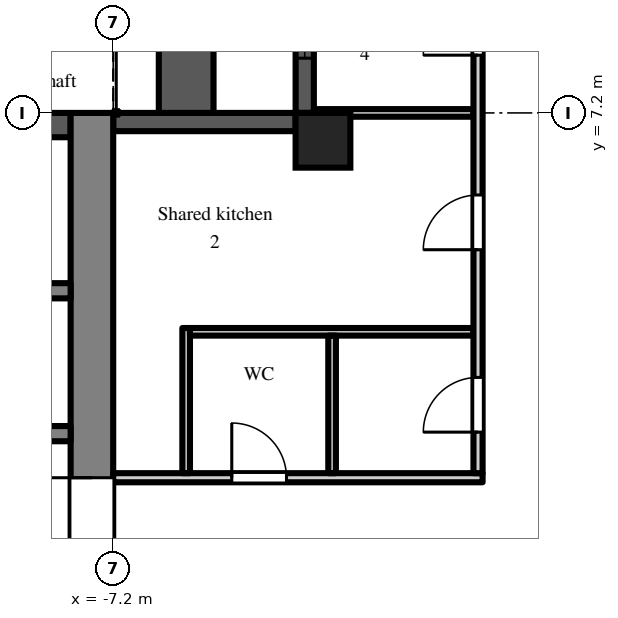
"""IFC4 building model, lengths in metres.
Left out: names, types, materials, properties, quantities, classifications, styles, units other than length and angle.
Written with IfcOpenShell. Run it as: python <this file> out.ifc"""

import sys

from ifc_helpers import new_model, si_unit, direction, frame, frame_2d, origin, origin_2d, place, context, subcontext, project, spatial, rectangle, extrude, element, fill, save


model = new_model("IFC4")
c1 = context("Model", 3, precision=1e-05, world=origin(), true_north=direction((0.0, 1.0)))
c2 = subcontext(c1, "Body", "Model", "MODEL_VIEW")
j1 = project(units=[si_unit("LENGTHUNIT", "METRE"), si_unit("PLANEANGLEUNIT", "RADIAN")], contexts=[c1])
p1 = place(None, origin())
s1 = spatial("IfcSite", under=j1, at=p1, CompositionType="ELEMENT")
p2 = place(p1, origin())
s2 = spatial("IfcBuilding", under=s1, at=p2, CompositionType="ELEMENT")
p3 = place(p2, frame((0.0, 0.0, 225.9)))
s3 = spatial("IfcBuildingStorey", under=s2, at=p3, CompositionType="ELEMENT", Elevation=225.9)
p4 = place(p3, frame((-3.75, 6.75, 0.0), z_axis=(0.0, 0.0, 1.0), x_axis=(1.0, 0.0, 0.0)))
e1 = element("IfcColumn", 1, at=p4, inside=s3, PredefinedType="COLUMN", context=c2, shape_type="SweptSolid", body=[
    extrude(rectangle(XDim=0.9, YDim=0.9, at=origin_2d()), origin(), (0.0, 0.0, 1.0), 3.0),
])
p5 = place(p3, frame((-4.05, 14.4, 0.0), z_axis=(0.0, 0.0, 1.0), x_axis=(0.0, -1.0, 0.0)))
e2 = element("IfcWall", 2, at=p5, inside=s3, PredefinedType="SOLIDWALL", context=c2, shape_type="SweptSolid", body=[
    extrude(rectangle(XDim=7.2, YDim=0.3, at=frame_2d((3.6, 0.0))), origin(), (0.0, 0.0, 1.0), 2.3),
])
p6 = place(p5, frame((3.0, 0.0, 0.0)))
e3 = element("IfcOpeningElement", 3, at=p6, cuts=e2, PredefinedType="OPENING", context=c2, shape_type="SweptSolid", body=[
    extrude(rectangle(XDim=1.2, YDim=2.05, at=frame_2d((0.6, 1.025))), frame((0.0, 0.16, 0.0), z_axis=(0.0, -1.0, 0.0), x_axis=(1.0, 0.0, 0.0)), (0.0, 0.0, 1.0), 0.32),
])
p7 = place(p5, frame((0.9, 0.0, 0.2)))
e4 = element("IfcOpeningElement", 4, at=p7, cuts=e2, PredefinedType="OPENING", context=c2, shape_type="SweptSolid", body=[
    extrude(rectangle(XDim=1.8, YDim=1.85, at=frame_2d((0.9, 0.925))), frame((0.0, 0.16, 0.0), z_axis=(0.0, -1.0, 0.0), x_axis=(1.0, 0.0, 0.0)), (0.0, 0.0, 1.0), 0.32),
])
p8 = place(p5, frame((4.5, 0.0, 0.2)))
e5 = element("IfcOpeningElement", 5, at=p8, cuts=e2, PredefinedType="OPENING", context=c2, shape_type="SweptSolid", body=[
    extrude(rectangle(XDim=1.8, YDim=1.85, at=frame_2d((0.9, 0.925))), frame((0.0, 0.16, 0.0), z_axis=(0.0, -1.0, 0.0), x_axis=(1.0, 0.0, 0.0)), (0.0, 0.0, 1.0), 0.32),
])
p9 = place(p3, frame((-4.2, 7.05, 0.0), z_axis=(0.0, 0.0, 1.0), x_axis=(-1.0, 0.0, 0.0)))
e6 = element("IfcWall", 6, at=p9, inside=s3, PredefinedType="SOLIDWALL", context=c2, shape_type="SweptSolid", body=[
    extrude(rectangle(XDim=3.0, YDim=0.3, at=frame_2d((1.5, 0.0))), origin(), (0.0, 0.0, 1.0), 2.3),
])
p10 = place(p3, frame((-6.0, 7.2, 0.0), z_axis=(0.0, 0.0, 1.0), x_axis=(0.0, 1.0, 0.0)))
e7 = element("IfcWall", 7, at=p10, inside=s3, PredefinedType="PARAPET", context=c2, shape_type="SweptSolid", body=[
    extrude(rectangle(XDim=7.2, YDim=0.9, at=frame_2d((3.6, 0.0))), origin(), (0.0, 0.0, 1.0), 0.8),
])
p11 = place(p3, frame((-7.55, -7.2, 0.0), z_axis=(0.0, 0.0, 1.0), x_axis=(0.0, 1.0, 0.0)))
e8 = element("IfcWall", 8, at=p11, inside=s3, PredefinedType="SHEAR", context=c2, shape_type="SweptSolid", body=[
    extrude(rectangle(XDim=14.4, YDim=0.7, at=frame_2d((7.2, 0.0))), origin(), (0.0, 0.0, 1.0), 2.6),
])
p12 = place(p11, frame((6.0, 0.0, 0.0)))
e9 = element("IfcOpeningElement", 9, at=p12, cuts=e8, PredefinedType="OPENING", context=c2, shape_type="SweptSolid", body=[
    extrude(rectangle(XDim=2.4, YDim=2.2, at=frame_2d((1.2, 1.1))), frame((0.0, 0.36, 0.0), z_axis=(0.0, -1.0, 0.0), x_axis=(1.0, 0.0, 0.0)), (0.0, 0.0, 1.0), 0.72),
])
p13 = place(p3, frame((-7.9, 7.0, 0.0), z_axis=(0.0, 0.0, 1.0), x_axis=(-1.0, 0.0, 0.0)))
e10 = element("IfcWall", 10, at=p13, inside=s3, PredefinedType="SHEAR", context=c2, shape_type="SweptSolid", body=[
    extrude(rectangle(XDim=12.95, YDim=0.4, at=frame_2d((6.475, 0.0))), origin(), (0.0, 0.0, 1.0), 2.6),
])
p14 = place(p3, frame((-7.9, 1.925, 0.0), z_axis=(0.0, 0.0, 1.0), x_axis=(-1.0, 0.0, 0.0)))
e11 = element("IfcWall", 11, at=p14, inside=s3, PredefinedType="SHEAR", context=c2, shape_type="SweptSolid", body=[
    extrude(rectangle(XDim=12.95, YDim=0.25, at=frame_2d((6.475, 0.0))), origin(), (0.0, 0.0, 1.0), 2.6),
])
p15 = place(p14, frame((4.825, 0.0, 0.0)))
e12 = element("IfcOpeningElement", 12, at=p15, cuts=e11, PredefinedType="OPENING", context=c2, shape_type="SweptSolid", body=[
    extrude(rectangle(XDim=1.1, YDim=2.1, at=frame_2d((0.55, 1.05))), frame((0.0, 0.135, 0.0), z_axis=(0.0, -1.0, 0.0), x_axis=(1.0, 0.0, 0.0)), (0.0, 0.0, 1.0), 0.27),
])
p16 = place(p14, frame((7.025, 0.0, 0.0)))
e13 = element("IfcOpeningElement", 13, at=p16, cuts=e11, PredefinedType="OPENING", context=c2, shape_type="SweptSolid", body=[
    extrude(rectangle(XDim=1.1, YDim=2.1, at=frame_2d((0.55, 1.05))), frame((0.0, 0.135, 0.0), z_axis=(0.0, -1.0, 0.0), x_axis=(1.0, 0.0, 0.0)), (0.0, 0.0, 1.0), 0.27),
])
p17 = place(p14, frame((9.225, 0.0, 0.0)))
e14 = element("IfcOpeningElement", 14, at=p17, cuts=e11, PredefinedType="OPENING", context=c2, shape_type="SweptSolid", body=[
    extrude(rectangle(XDim=1.1, YDim=2.1, at=frame_2d((0.55, 1.05))), frame((0.0, 0.135, 0.0), z_axis=(0.0, -1.0, 0.0), x_axis=(1.0, 0.0, 0.0)), (0.0, 0.0, 1.0), 0.27),
])
p18 = place(p14, frame((0.525, 0.0, 0.0)))
e15 = element("IfcOpeningElement", 15, at=p18, cuts=e11, PredefinedType="OPENING", context=c2, shape_type="SweptSolid", body=[
    extrude(rectangle(XDim=0.9, YDim=2.1, at=frame_2d((0.45, 1.05))), frame((0.0, 0.135, 0.0), z_axis=(0.0, -1.0, 0.0), x_axis=(1.0, 0.0, 0.0)), (0.0, 0.0, 1.0), 0.27),
])
p19 = place(p14, frame((2.625, 0.0, 0.0)))
e16 = element("IfcOpeningElement", 16, at=p19, cuts=e11, PredefinedType="OPENING", context=c2, shape_type="SweptSolid", body=[
    extrude(rectangle(XDim=1.1, YDim=2.1, at=frame_2d((0.55, 1.05))), frame((0.0, 0.135, 0.0), z_axis=(0.0, -1.0, 0.0), x_axis=(1.0, 0.0, 0.0)), (0.0, 0.0, 1.0), 0.27),
])
p20 = place(p14, frame((11.525, 0.0, 0.0)))
e17 = element("IfcOpeningElement", 17, at=p20, cuts=e11, PredefinedType="OPENING", context=c2, shape_type="SweptSolid", body=[
    extrude(rectangle(XDim=0.9, YDim=2.1, at=frame_2d((0.45, 1.05))), frame((0.0, 0.135, 0.0), z_axis=(0.0, -1.0, 0.0), x_axis=(1.0, 0.0, 0.0)), (0.0, 0.0, 1.0), 0.27),
])
p21 = place(p3, frame((-7.9, 4.275, 0.0), z_axis=(0.0, 0.0, 1.0), x_axis=(-1.0, 0.0, 0.0)))
e18 = element("IfcWall", 18, at=p21, inside=s3, PredefinedType="SHEAR", context=c2, shape_type="SweptSolid", body=[
    extrude(rectangle(XDim=1.95, YDim=0.25, at=frame_2d((0.975, 0.0))), origin(), (0.0, 0.0, 1.0), 2.6),
])
p22 = place(p3, frame((-7.2, 1.2, 0.0), z_axis=(0.0, 0.0, 1.0), x_axis=(1.0, 0.0, 0.0)))
e19 = element("IfcWall", 19, at=p22, inside=s3, PredefinedType="PARTITIONING", context=c2, shape_type="SweptSolid", body=[
    extrude(rectangle(XDim=6.075, YDim=0.15, at=frame_2d((3.038, 0.0))), origin(), (0.0, 0.0, 1.0), 2.6),
])
p23 = place(p22, frame((1.95, 0.0, 0.0)))
e20 = element("IfcOpeningElement", 20, at=p23, cuts=e19, PredefinedType="OPENING", context=c2, shape_type="SweptSolid", body=[
    extrude(rectangle(XDim=0.9, YDim=2.1, at=frame_2d((0.45, 1.05))), frame((0.0, 0.085, 0.0), z_axis=(0.0, -1.0, 0.0), x_axis=(1.0, 0.0, 0.0)), (0.0, 0.0, 1.0), 0.17),
])
p24 = place(p3, frame((-6.0, 1.275, 0.0), z_axis=(0.0, 0.0, 1.0), x_axis=(0.0, 1.0, 0.0)))
e21 = element("IfcWall", 21, at=p24, inside=s3, PredefinedType="PARTITIONING", context=c2, shape_type="SweptSolid", body=[
    extrude(rectangle(XDim=2.388, YDim=0.125, at=frame_2d((1.194, 0.0))), origin(), (0.0, 0.0, 1.0), 2.6),
])
p25 = place(p3, frame((-5.938, 3.6, 0.0), z_axis=(0.0, 0.0, 1.0), x_axis=(1.0, 0.0, 0.0)))
e22 = element("IfcWall", 22, at=p25, inside=s3, PredefinedType="PARTITIONING", context=c2, shape_type="SweptSolid", body=[
    extrude(rectangle(XDim=4.663, YDim=0.125, at=frame_2d((2.331, 0.0))), origin(), (0.0, 0.0, 1.0), 2.6),
])
p26 = place(p3, frame((-3.9, 7.2, 0.0), z_axis=(0.0, 0.0, 1.0), x_axis=(1.0, 0.0, 0.0)))
e23 = element("IfcWall", 23, at=p26, inside=s3, PredefinedType="PARTITIONING", context=c2, shape_type="SweptSolid", body=[
    extrude(rectangle(XDim=2.625, YDim=0.125, at=frame_2d((1.312, 0.0))), origin(), (0.0, 0.0, 1.0), 2.6),
])
p27 = place(p3, frame((-3.6, 1.275, 0.0), z_axis=(0.0, 0.0, 1.0), x_axis=(0.0, 1.0, 0.0)))
e24 = element("IfcWall", 24, at=p27, inside=s3, PredefinedType="PARTITIONING", context=c2, shape_type="SweptSolid", body=[
    extrude(rectangle(XDim=2.263, YDim=0.125, at=frame_2d((1.131, 0.0))), origin(), (0.0, 0.0, 1.0), 2.6),
])
p28 = place(p3, frame((-1.2, 1.275, 0.0), z_axis=(0.0, 0.0, 1.0), x_axis=(0.0, 1.0, 0.0)))
e25 = element("IfcWall", 25, at=p28, inside=s3, PredefinedType="PARTITIONING", context=c2, shape_type="SweptSolid", body=[
    extrude(rectangle(XDim=18.25, YDim=0.15, at=frame_2d((9.125, 0.0))), origin(), (0.0, 0.0, 1.0), 2.6),
])
p29 = place(p28, frame((0.675, 0.0, 0.0)))
e26 = element("IfcOpeningElement", 26, at=p29, cuts=e25, PredefinedType="OPENING", context=c2, shape_type="SweptSolid", body=[
    extrude(rectangle(XDim=0.9, YDim=2.1, at=frame_2d((0.45, 1.05))), frame((0.0, 0.085, 0.0), z_axis=(0.0, -1.0, 0.0), x_axis=(1.0, 0.0, 0.0)), (0.0, 0.0, 1.0), 0.17),
])
p30 = place(p28, frame((3.675, 0.0, 0.0)))
e27 = element("IfcOpeningElement", 27, at=p30, cuts=e25, PredefinedType="OPENING", context=c2, shape_type="SweptSolid", body=[
    extrude(rectangle(XDim=0.9, YDim=2.1, at=frame_2d((0.45, 1.05))), frame((0.0, 0.085, 0.0), z_axis=(0.0, -1.0, 0.0), x_axis=(1.0, 0.0, 0.0)), (0.0, 0.0, 1.0), 0.17),
])
p31 = place(p28, frame((6.875, 0.0, 0.0)))
e28 = element("IfcOpeningElement", 28, at=p31, cuts=e25, PredefinedType="OPENING", context=c2, shape_type="SweptSolid", body=[
    extrude(rectangle(XDim=0.9, YDim=2.1, at=frame_2d((0.45, 1.05))), frame((0.0, 0.085, 0.0), z_axis=(0.0, -1.0, 0.0), x_axis=(1.0, 0.0, 0.0)), (0.0, 0.0, 1.0), 0.17),
])
p32 = place(p28, frame((10.475, 0.0, 0.0)))
e29 = element("IfcOpeningElement", 29, at=p32, cuts=e25, PredefinedType="OPENING", context=c2, shape_type="SweptSolid", body=[
    extrude(rectangle(XDim=0.9, YDim=2.1, at=frame_2d((0.45, 1.05))), frame((0.0, 0.085, 0.0), z_axis=(0.0, -1.0, 0.0), x_axis=(1.0, 0.0, 0.0)), (0.0, 0.0, 1.0), 0.17),
])
p33 = place(p28, frame((13.725, 0.0, 0.0)))
e30 = element("IfcOpeningElement", 30, at=p33, cuts=e25, PredefinedType="OPENING", context=c2, shape_type="SweptSolid", body=[
    extrude(rectangle(XDim=1.0, YDim=2.1, at=frame_2d((0.5, 1.05))), frame((0.0, 0.085, 0.0), z_axis=(0.0, -1.0, 0.0), x_axis=(1.0, 0.0, 0.0)), (0.0, 0.0, 1.0), 0.17),
])
p34 = place(p28, frame((17.075, 0.0, 0.0)))
e31 = element("IfcOpeningElement", 31, at=p34, cuts=e25, PredefinedType="OPENING", context=c2, shape_type="SweptSolid", body=[
    extrude(rectangle(XDim=0.9, YDim=2.1, at=frame_2d((0.45, 1.05))), frame((0.0, 0.085, 0.0), z_axis=(0.0, -1.0, 0.0), x_axis=(1.0, 0.0, 0.0)), (0.0, 0.0, 1.0), 0.17),
])
p35 = place(p8, origin())
e32 = element("IfcWindow", 32, at=p35, inside=s3, PartitioningType="SINGLE_PANEL", PredefinedType="WINDOW", context=c2, shape_type="SweptSolid", body=[
    extrude(rectangle(XDim=1.8, YDim=1.85, at=frame_2d((0.9, 0.925))), frame((0.0, 0.03, 0.0), z_axis=(0.0, -1.0, 0.0), x_axis=(1.0, 0.0, 0.0)), (0.0, 0.0, 1.0), 0.06),
])
fill(e5, e32)
p36 = place(p12, origin())
e33 = element("IfcDoor", 33, at=p36, inside=s3, OperationType="DOUBLE_DOOR_DOUBLE_SWING", PredefinedType="DOOR", context=c2, shape_type="SweptSolid", body=[
    extrude(rectangle(XDim=2.4, YDim=2.2, at=frame_2d((1.2, 1.1))), frame((0.0, 0.025, 0.0), z_axis=(0.0, -1.0, 0.0), x_axis=(1.0, 0.0, 0.0)), (0.0, 0.0, 1.0), 0.05),
])
fill(e9, e33)
p37 = place(p29, origin())
e34 = element("IfcDoor", 34, at=p37, inside=s3, OperationType="SINGLE_SWING_LEFT", PredefinedType="DOOR", context=c2, shape_type="SweptSolid", body=[
    extrude(rectangle(XDim=0.9, YDim=2.1, at=frame_2d((0.45, 1.05))), frame((0.0, 0.025, 0.0), z_axis=(0.0, -1.0, 0.0), x_axis=(1.0, 0.0, 0.0)), (0.0, 0.0, 1.0), 0.05),
])
fill(e26, e34)
p38 = place(p23, origin())
e35 = element("IfcDoor", 35, at=p38, inside=s3, OperationType="SINGLE_SWING_LEFT", PredefinedType="DOOR", context=c2, shape_type="SweptSolid", body=[
    extrude(rectangle(XDim=0.9, YDim=2.1, at=frame_2d((0.45, 1.05))), frame((0.0, 0.025, 0.0), z_axis=(0.0, -1.0, 0.0), x_axis=(1.0, 0.0, 0.0)), (0.0, 0.0, 1.0), 0.05),
])
fill(e20, e35)
p39 = place(p30, origin())
e36 = element("IfcDoor", 36, at=p39, inside=s3, OperationType="SINGLE_SWING_LEFT", PredefinedType="DOOR", context=c2, shape_type="SweptSolid", body=[
    extrude(rectangle(XDim=0.9, YDim=2.1, at=frame_2d((0.45, 1.05))), frame((0.0, 0.025, 0.0), z_axis=(0.0, -1.0, 0.0), x_axis=(1.0, 0.0, 0.0)), (0.0, 0.0, 1.0), 0.05),
])
fill(e27, e36)
p40 = place(p31, origin())
e37 = element("IfcDoor", 37, at=p40, inside=s3, OperationType="SINGLE_SWING_LEFT", PredefinedType="DOOR", context=c2, shape_type="SweptSolid", body=[
    extrude(rectangle(XDim=0.9, YDim=2.1, at=frame_2d((0.45, 1.05))), frame((0.0, 0.025, 0.0), z_axis=(0.0, -1.0, 0.0), x_axis=(1.0, 0.0, 0.0)), (0.0, 0.0, 1.0), 0.05),
])
fill(e28, e37)
save(model, sys.argv[1])
